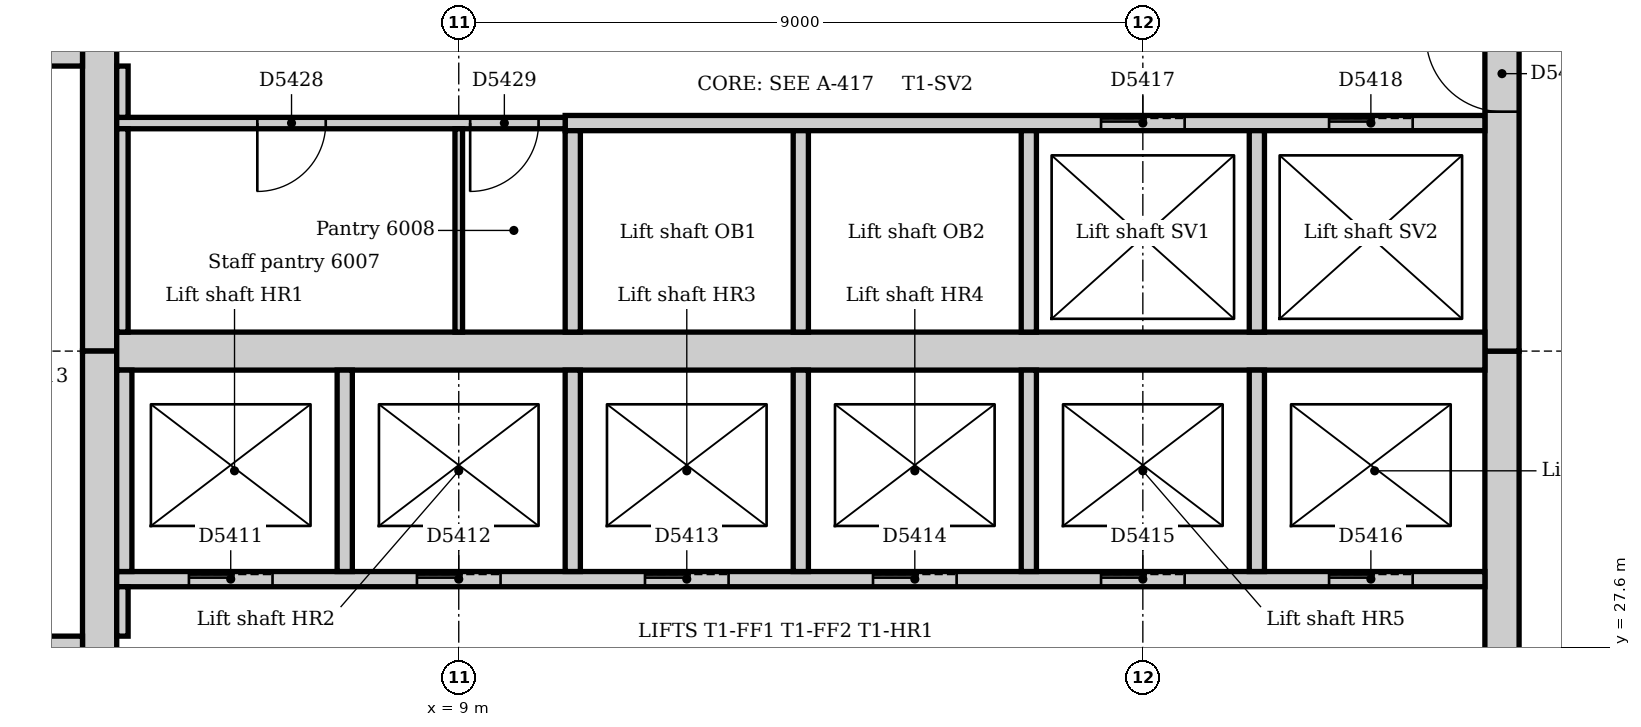
"""IFC4 building model, lengths in metres.
Left out: names, types, materials, properties, quantities, classifications, styles, units other than length and angle.
Written with IfcOpenShell. Run it as: python <this file> out.ifc"""

import sys

from ifc_helpers import new_model, si_unit, direction, frame, frame_2d, origin, place, context, subcontext, project, spatial, rectangle, extrude, element, fill, save


model = new_model("IFC4")
c1 = context("Model", 3, precision=1e-05, world=origin(), true_north=direction((0.0, 1.0)))
c2 = subcontext(c1, "Body", "Model", "MODEL_VIEW")
j1 = project(units=[si_unit("LENGTHUNIT", "METRE"), si_unit("PLANEANGLEUNIT", "RADIAN")], contexts=[c1])
p1 = place(None, origin())
s1 = spatial("IfcSite", under=j1, at=p1, CompositionType="ELEMENT")
p2 = place(p1, origin())
s2 = spatial("IfcBuilding", under=s1, at=p2, CompositionType="ELEMENT")
p3 = place(p2, frame((0.0, 0.0, 251.0)))
s3 = spatial("IfcBuildingStorey", under=s2, at=p3, CompositionType="ELEMENT", Elevation=251.0)
p4 = place(p3, frame((22.725, 21.0, 0.0), z_axis=(0.0, 0.0, 1.0), x_axis=(0.0, 1.0, 0.0)))
e1 = element("IfcWall", 1, at=p4, inside=s3, PredefinedType="SOLIDWALL", context=c2, shape_type="SweptSolid", body=[
    extrude(rectangle(XDim=10.5, YDim=0.45, at=frame_2d((5.25, 0.0))), origin(), (0.0, 0.0, 1.0), 4.0),
])
p5 = place(p4, frame((4.35, 0.0, 0.0)))
e2 = element("IfcOpeningElement", 2, at=p5, cuts=e1, PredefinedType="OPENING", context=c2, shape_type="SweptSolid", body=[
    extrude(rectangle(XDim=1.8, YDim=2.1, at=frame_2d((0.9, 1.05))), frame((0.0, 0.235, 0.0), z_axis=(0.0, -1.0, 0.0), x_axis=(1.0, 0.0, 0.0)), (0.0, 0.0, 1.0), 0.47),
])
p6 = place(p3, frame((22.725, 31.5, 0.0), z_axis=(0.0, 0.0, 1.0), x_axis=(0.0, 1.0, 0.0)))
e3 = element("IfcWall", 3, at=p6, inside=s3, PredefinedType="SOLIDWALL", context=c2, shape_type="SweptSolid", body=[
    extrude(rectangle(XDim=10.5, YDim=0.45, at=frame_2d((5.25, 0.0))), origin(), (0.0, 0.0, 1.0), 4.0),
])
p7 = place(p6, frame((3.15, 0.0, 0.0)))
e4 = element("IfcOpeningElement", 4, at=p7, cuts=e3, PredefinedType="OPENING", context=c2, shape_type="SweptSolid", body=[
    extrude(rectangle(XDim=1.0, YDim=2.1, at=frame_2d((0.5, 1.05))), frame((0.0, 0.235, 0.0), z_axis=(0.0, -1.0, 0.0), x_axis=(1.0, 0.0, 0.0)), (0.0, 0.0, 1.0), 0.47),
])
p8 = place(p6, frame((5.2, 0.0, 0.0)))
e5 = element("IfcOpeningElement", 5, at=p8, cuts=e3, PredefinedType="OPENING", context=c2, shape_type="SweptSolid", body=[
    extrude(rectangle(XDim=1.0, YDim=2.1, at=frame_2d((0.5, 1.05))), frame((0.0, 0.235, 0.0), z_axis=(0.0, -1.0, 0.0), x_axis=(1.0, 0.0, 0.0)), (0.0, 0.0, 1.0), 0.47),
])
p9 = place(p3, frame((4.275, 42.0, 0.0), z_axis=(0.0, 0.0, 1.0), x_axis=(0.0, -1.0, 0.0)))
e6 = element("IfcWall", 6, at=p9, inside=s3, PredefinedType="SOLIDWALL", context=c2, shape_type="SweptSolid", body=[
    extrude(rectangle(XDim=10.5, YDim=0.45, at=frame_2d((5.25, 0.0))), origin(), (0.0, 0.0, 1.0), 4.0),
])
p10 = place(p9, frame((5.3, 0.0, 0.0)))
e7 = element("IfcOpeningElement", 7, at=p10, cuts=e6, PredefinedType="OPENING", context=c2, shape_type="SweptSolid", body=[
    extrude(rectangle(XDim=1.0, YDim=2.1, at=frame_2d((0.5, 1.05))), frame((0.0, 0.235, 0.0), z_axis=(0.0, -1.0, 0.0), x_axis=(1.0, 0.0, 0.0)), (0.0, 0.0, 1.0), 0.47),
])
p11 = place(p3, frame((4.275, 31.5, 0.0), z_axis=(0.0, 0.0, 1.0), x_axis=(0.0, -1.0, 0.0)))
e8 = element("IfcWall", 8, at=p11, inside=s3, PredefinedType="SOLIDWALL", context=c2, shape_type="SweptSolid", body=[
    extrude(rectangle(XDim=10.5, YDim=0.45, at=frame_2d((5.25, 0.0))), origin(), (0.0, 0.0, 1.0), 4.0),
])
p12 = place(p11, frame((4.25, 0.0, 0.0)))
e9 = element("IfcOpeningElement", 9, at=p12, cuts=e8, PredefinedType="OPENING", context=c2, shape_type="SweptSolid", body=[
    extrude(rectangle(XDim=1.0, YDim=2.1, at=frame_2d((0.5, 1.05))), frame((0.0, 0.235, 0.0), z_axis=(0.0, -1.0, 0.0), x_axis=(1.0, 0.0, 0.0)), (0.0, 0.0, 1.0), 0.47),
])
p13 = place(p3, frame((4.5, 31.5, 0.0), z_axis=(0.0, 0.0, 1.0), x_axis=(1.0, 0.0, 0.0)))
e10 = element("IfcWall", 10, at=p13, inside=s3, PredefinedType="SOLIDWALL", context=c2, shape_type="SweptSolid", body=[
    extrude(rectangle(XDim=18.0, YDim=0.5, at=frame_2d((9.0, 0.0))), origin(), (0.0, 0.0, 1.0), 4.0),
])
p14 = place(p3, frame((4.05, 27.625, 0.0), z_axis=(0.0, 0.0, 1.0), x_axis=(-1.0, 0.0, 0.0)))
e11 = element("IfcWall", 11, at=p14, inside=s3, PredefinedType="SOLIDWALL", context=c2, shape_type="SweptSolid", body=[
    extrude(rectangle(XDim=3.69, YDim=0.25, at=frame_2d((1.845, 0.0))), origin(), (0.0, 0.0, 1.0), 4.0),
])
p15 = place(p14, frame((0.55, 0.0, 0.0)))
e12 = element("IfcOpeningElement", 12, at=p15, cuts=e11, PredefinedType="OPENING", context=c2, shape_type="SweptSolid", body=[
    extrude(rectangle(XDim=1.0, YDim=2.1, at=frame_2d((0.5, 1.05))), frame((0.0, 0.135, 0.0), z_axis=(0.0, -1.0, 0.0), x_axis=(1.0, 0.0, 0.0)), (0.0, 0.0, 1.0), 0.27),
])
p16 = place(p3, frame((0.36, 35.375, 0.0), z_axis=(0.0, 0.0, 1.0), x_axis=(1.0, 0.0, 0.0)))
e13 = element("IfcWall", 13, at=p16, inside=s3, PredefinedType="SOLIDWALL", context=c2, shape_type="SweptSolid", body=[
    extrude(rectangle(XDim=3.69, YDim=0.25, at=frame_2d((1.845, 0.0))), origin(), (0.0, 0.0, 1.0), 4.0),
])
p17 = place(p16, frame((2.14, 0.0, 0.0)))
e14 = element("IfcOpeningElement", 14, at=p17, cuts=e13, PredefinedType="OPENING", context=c2, shape_type="SweptSolid", body=[
    extrude(rectangle(XDim=1.0, YDim=2.1, at=frame_2d((0.5, 1.05))), frame((0.0, 0.135, 0.0), z_axis=(0.0, -1.0, 0.0), x_axis=(1.0, 0.0, 0.0)), (0.0, 0.0, 1.0), 0.27),
])
p18 = place(p3, frame((4.5, 28.5, 0.0), z_axis=(0.0, 0.0, 1.0), x_axis=(1.0, 0.0, 0.0)))
e15 = element("IfcWall", 15, at=p18, inside=s3, PredefinedType="PARTITIONING", context=c2, shape_type="SweptSolid", body=[
    extrude(rectangle(XDim=18.0, YDim=0.2, at=frame_2d((9.0, 0.0))), origin(), (0.0, 0.0, 1.0), 3.85),
])
p19 = place(p18, frame((0.95, 0.0, 0.0)))
e16 = element("IfcOpeningElement", 16, at=p19, cuts=e15, PredefinedType="OPENING", context=c2, shape_type="SweptSolid", body=[
    extrude(rectangle(XDim=1.1, YDim=2.1, at=frame_2d((0.55, 1.05))), frame((0.0, 0.11, 0.0), z_axis=(0.0, -1.0, 0.0), x_axis=(1.0, 0.0, 0.0)), (0.0, 0.0, 1.0), 0.22),
])
p20 = place(p18, frame((3.95, 0.0, 0.0)))
e17 = element("IfcOpeningElement", 17, at=p20, cuts=e15, PredefinedType="OPENING", context=c2, shape_type="SweptSolid", body=[
    extrude(rectangle(XDim=1.1, YDim=2.1, at=frame_2d((0.55, 1.05))), frame((0.0, 0.11, 0.0), z_axis=(0.0, -1.0, 0.0), x_axis=(1.0, 0.0, 0.0)), (0.0, 0.0, 1.0), 0.22),
])
p21 = place(p18, frame((6.95, 0.0, 0.0)))
e18 = element("IfcOpeningElement", 18, at=p21, cuts=e15, PredefinedType="OPENING", context=c2, shape_type="SweptSolid", body=[
    extrude(rectangle(XDim=1.1, YDim=2.1, at=frame_2d((0.55, 1.05))), frame((0.0, 0.11, 0.0), z_axis=(0.0, -1.0, 0.0), x_axis=(1.0, 0.0, 0.0)), (0.0, 0.0, 1.0), 0.22),
])
p22 = place(p18, frame((9.95, 0.0, 0.0)))
e19 = element("IfcOpeningElement", 19, at=p22, cuts=e15, PredefinedType="OPENING", context=c2, shape_type="SweptSolid", body=[
    extrude(rectangle(XDim=1.1, YDim=2.1, at=frame_2d((0.55, 1.05))), frame((0.0, 0.11, 0.0), z_axis=(0.0, -1.0, 0.0), x_axis=(1.0, 0.0, 0.0)), (0.0, 0.0, 1.0), 0.22),
])
p23 = place(p18, frame((12.95, 0.0, 0.0)))
e20 = element("IfcOpeningElement", 20, at=p23, cuts=e15, PredefinedType="OPENING", context=c2, shape_type="SweptSolid", body=[
    extrude(rectangle(XDim=1.1, YDim=2.1, at=frame_2d((0.55, 1.05))), frame((0.0, 0.11, 0.0), z_axis=(0.0, -1.0, 0.0), x_axis=(1.0, 0.0, 0.0)), (0.0, 0.0, 1.0), 0.22),
])
p24 = place(p18, frame((15.95, 0.0, 0.0)))
e21 = element("IfcOpeningElement", 21, at=p24, cuts=e15, PredefinedType="OPENING", context=c2, shape_type="SweptSolid", body=[
    extrude(rectangle(XDim=1.1, YDim=2.1, at=frame_2d((0.55, 1.05))), frame((0.0, 0.11, 0.0), z_axis=(0.0, -1.0, 0.0), x_axis=(1.0, 0.0, 0.0)), (0.0, 0.0, 1.0), 0.22),
])
p25 = place(p3, frame((10.4, 34.5, 0.0), z_axis=(0.0, 0.0, 1.0), x_axis=(1.0, 0.0, 0.0)))
e22 = element("IfcWall", 22, at=p25, inside=s3, PredefinedType="PARTITIONING", context=c2, shape_type="SweptSolid", body=[
    extrude(rectangle(XDim=12.1, YDim=0.2, at=frame_2d((6.05, 0.0))), origin(), (0.0, 0.0, 1.0), 3.85),
])
p26 = place(p25, frame((7.05, 0.0, 0.0)))
e23 = element("IfcOpeningElement", 23, at=p26, cuts=e22, PredefinedType="OPENING", context=c2, shape_type="SweptSolid", body=[
    extrude(rectangle(XDim=1.1, YDim=2.1, at=frame_2d((0.55, 1.05))), frame((0.0, 0.11, 0.0), z_axis=(0.0, -1.0, 0.0), x_axis=(1.0, 0.0, 0.0)), (0.0, 0.0, 1.0), 0.22),
])
p27 = place(p25, frame((10.05, 0.0, 0.0)))
e24 = element("IfcOpeningElement", 24, at=p27, cuts=e22, PredefinedType="OPENING", context=c2, shape_type="SweptSolid", body=[
    extrude(rectangle(XDim=1.1, YDim=2.1, at=frame_2d((0.55, 1.05))), frame((0.0, 0.11, 0.0), z_axis=(0.0, -1.0, 0.0), x_axis=(1.0, 0.0, 0.0)), (0.0, 0.0, 1.0), 0.22),
])
for number, where, z_axis, x_axis in (
    (25, (10.5, 28.6, 0.0), (0.0, 0.0, 1.0), (0.0, 1.0, 0.0)),
    (26, (10.5, 31.75, 0.0), (0.0, 0.0, 1.0), (0.0, 1.0, 0.0)),
    (27, (13.5, 28.6, 0.0), (0.0, 0.0, 1.0), (0.0, 1.0, 0.0)),
    (28, (13.5, 31.75, 0.0), (0.0, 0.0, 1.0), (0.0, 1.0, 0.0)),
    (29, (16.5, 28.6, 0.0), (0.0, 0.0, 1.0), (0.0, 1.0, 0.0)),
    (30, (16.5, 31.75, 0.0), (0.0, 0.0, 1.0), (0.0, 1.0, 0.0)),
    (31, (19.5, 28.6, 0.0), (0.0, 0.0, 1.0), (0.0, 1.0, 0.0)),
    (32, (19.5, 31.75, 0.0), (0.0, 0.0, 1.0), (0.0, 1.0, 0.0)),
    (33, (4.6, 28.6, 0.0), (0.0, 0.0, 1.0), (0.0, 1.0, 0.0)),
    (34, (7.5, 28.6, 0.0), (0.0, 0.0, 1.0), (0.0, 1.0, 0.0)),
):
    element("IfcWall", number, at=place(p3, frame(where, z_axis=z_axis, x_axis=x_axis)), inside=s3, PredefinedType="PARTITIONING", context=c2, shape_type="SweptSolid", body=[
        extrude(rectangle(XDim=2.65, YDim=0.2, at=frame_2d((1.325, 0.0))), origin(), (0.0, 0.0, 1.0), 3.85),
    ])
p28 = place(p3, frame((4.5, 34.5, 0.0), z_axis=(0.0, 0.0, 1.0), x_axis=(1.0, 0.0, 0.0)))
e35 = element("IfcWall", 35, at=p28, inside=s3, PredefinedType="PARTITIONING", context=c2, shape_type="SweptSolid", body=[
    extrude(rectangle(XDim=5.9, YDim=0.15, at=frame_2d((2.95, 0.0))), origin(), (0.0, 0.0, 1.0), 3.85),
])
p29 = place(p28, frame((1.85, 0.0, 0.0)))
e36 = element("IfcOpeningElement", 36, at=p29, cuts=e35, PredefinedType="OPENING", context=c2, shape_type="SweptSolid", body=[
    extrude(rectangle(XDim=0.9, YDim=2.1, at=frame_2d((0.45, 1.05))), frame((0.0, 0.085, 0.0), z_axis=(0.0, -1.0, 0.0), x_axis=(1.0, 0.0, 0.0)), (0.0, 0.0, 1.0), 0.17),
])
p30 = place(p28, frame((4.65, 0.0, 0.0)))
e37 = element("IfcOpeningElement", 37, at=p30, cuts=e35, PredefinedType="OPENING", context=c2, shape_type="SweptSolid", body=[
    extrude(rectangle(XDim=0.9, YDim=2.1, at=frame_2d((0.45, 1.05))), frame((0.0, 0.085, 0.0), z_axis=(0.0, -1.0, 0.0), x_axis=(1.0, 0.0, 0.0)), (0.0, 0.0, 1.0), 0.17),
])
p31 = place(p3, frame((4.575, 34.575, 0.0), z_axis=(0.0, 0.0, 1.0), x_axis=(0.0, 1.0, 0.0)))
e38 = element("IfcWall", 38, at=p31, inside=s3, PredefinedType="PARTITIONING", context=c2, shape_type="SweptSolid", body=[
    extrude(rectangle(XDim=0.675, YDim=0.15, at=frame_2d((0.338, 0.0))), origin(), (0.0, 0.0, 1.0), 3.85),
])
p32 = place(p3, frame((4.575, 31.75, 0.0), z_axis=(0.0, 0.0, 1.0), x_axis=(0.0, 1.0, 0.0)))
e39 = element("IfcWall", 39, at=p32, inside=s3, PredefinedType="PARTITIONING", context=c2, shape_type="SweptSolid", body=[
    extrude(rectangle(XDim=2.675, YDim=0.15, at=frame_2d((1.337, 0.0))), origin(), (0.0, 0.0, 1.0), 3.85),
])
p33 = place(p3, frame((4.575, 27.75, 0.0), z_axis=(0.0, 0.0, 1.0), x_axis=(0.0, 1.0, 0.0)))
e40 = element("IfcWall", 40, at=p33, inside=s3, PredefinedType="PARTITIONING", context=c2, shape_type="SweptSolid", body=[
    extrude(rectangle(XDim=0.65, YDim=0.15, at=frame_2d((0.325, 0.0))), origin(), (0.0, 0.0, 1.0), 3.85),
])
p34 = place(p3, frame((9.0, 31.75, 0.0), z_axis=(0.0, 0.0, 1.0), x_axis=(0.0, 1.0, 0.0)))
e41 = element("IfcWall", 41, at=p34, inside=s3, PredefinedType="PARTITIONING", context=c2, shape_type="SweptSolid", body=[
    extrude(rectangle(XDim=2.675, YDim=0.1, at=frame_2d((1.337, 0.0))), origin(), (0.0, 0.0, 1.0), 3.85),
])
p35 = place(p19, origin())
e42 = element("IfcDoor", 42, at=p35, inside=s3, OperationType="SLIDING_TO_LEFT", PredefinedType="DOOR", context=c2, shape_type="SweptSolid", body=[
    extrude(rectangle(XDim=1.1, YDim=2.1, at=frame_2d((0.55, 1.05))), frame((0.0, 0.025, 0.0), z_axis=(0.0, -1.0, 0.0), x_axis=(1.0, 0.0, 0.0)), (0.0, 0.0, 1.0), 0.05),
])
fill(e16, e42)
p36 = place(p20, origin())
e43 = element("IfcDoor", 43, at=p36, inside=s3, OperationType="SLIDING_TO_LEFT", PredefinedType="DOOR", context=c2, shape_type="SweptSolid", body=[
    extrude(rectangle(XDim=1.1, YDim=2.1, at=frame_2d((0.55, 1.05))), frame((0.0, 0.025, 0.0), z_axis=(0.0, -1.0, 0.0), x_axis=(1.0, 0.0, 0.0)), (0.0, 0.0, 1.0), 0.05),
])
fill(e17, e43)
p37 = place(p21, origin())
e44 = element("IfcDoor", 44, at=p37, inside=s3, OperationType="SLIDING_TO_LEFT", PredefinedType="DOOR", context=c2, shape_type="SweptSolid", body=[
    extrude(rectangle(XDim=1.1, YDim=2.1, at=frame_2d((0.55, 1.05))), frame((0.0, 0.025, 0.0), z_axis=(0.0, -1.0, 0.0), x_axis=(1.0, 0.0, 0.0)), (0.0, 0.0, 1.0), 0.05),
])
fill(e18, e44)
p38 = place(p22, origin())
e45 = element("IfcDoor", 45, at=p38, inside=s3, OperationType="SLIDING_TO_LEFT", PredefinedType="DOOR", context=c2, shape_type="SweptSolid", body=[
    extrude(rectangle(XDim=1.1, YDim=2.1, at=frame_2d((0.55, 1.05))), frame((0.0, 0.025, 0.0), z_axis=(0.0, -1.0, 0.0), x_axis=(1.0, 0.0, 0.0)), (0.0, 0.0, 1.0), 0.05),
])
fill(e19, e45)
p39 = place(p23, origin())
e46 = element("IfcDoor", 46, at=p39, inside=s3, OperationType="SLIDING_TO_LEFT", PredefinedType="DOOR", context=c2, shape_type="SweptSolid", body=[
    extrude(rectangle(XDim=1.1, YDim=2.1, at=frame_2d((0.55, 1.05))), frame((0.0, 0.025, 0.0), z_axis=(0.0, -1.0, 0.0), x_axis=(1.0, 0.0, 0.0)), (0.0, 0.0, 1.0), 0.05),
])
fill(e20, e46)
p40 = place(p24, origin())
e47 = element("IfcDoor", 47, at=p40, inside=s3, OperationType="SLIDING_TO_LEFT", PredefinedType="DOOR", context=c2, shape_type="SweptSolid", body=[
    extrude(rectangle(XDim=1.1, YDim=2.1, at=frame_2d((0.55, 1.05))), frame((0.0, 0.025, 0.0), z_axis=(0.0, -1.0, 0.0), x_axis=(1.0, 0.0, 0.0)), (0.0, 0.0, 1.0), 0.05),
])
fill(e21, e47)
p41 = place(p26, origin())
e48 = element("IfcDoor", 48, at=p41, inside=s3, OperationType="SLIDING_TO_LEFT", PredefinedType="DOOR", context=c2, shape_type="SweptSolid", body=[
    extrude(rectangle(XDim=1.1, YDim=2.1, at=frame_2d((0.55, 1.05))), frame((0.0, 0.025, 0.0), z_axis=(0.0, -1.0, 0.0), x_axis=(1.0, 0.0, 0.0)), (0.0, 0.0, 1.0), 0.05),
])
fill(e23, e48)
p42 = place(p27, origin())
e49 = element("IfcDoor", 49, at=p42, inside=s3, OperationType="SLIDING_TO_LEFT", PredefinedType="DOOR", context=c2, shape_type="SweptSolid", body=[
    extrude(rectangle(XDim=1.1, YDim=2.1, at=frame_2d((0.55, 1.05))), frame((0.0, 0.025, 0.0), z_axis=(0.0, -1.0, 0.0), x_axis=(1.0, 0.0, 0.0)), (0.0, 0.0, 1.0), 0.05),
])
fill(e24, e49)
p43 = place(p7, origin())
e50 = element("IfcDoor", 50, at=p43, inside=s3, OperationType="SINGLE_SWING_RIGHT", PredefinedType="DOOR", context=c2, shape_type="SweptSolid", body=[
    extrude(rectangle(XDim=1.0, YDim=2.1, at=frame_2d((0.5, 1.05))), frame((0.0, 0.025, 0.0), z_axis=(0.0, -1.0, 0.0), x_axis=(1.0, 0.0, 0.0)), (0.0, 0.0, 1.0), 0.05),
])
fill(e4, e50)
p44 = place(p29, frame((0.9, 0.0, 0.0), z_axis=(0.0, 0.0, 1.0), x_axis=(-1.0, 0.0, 0.0)))
e51 = element("IfcDoor", 51, at=p44, inside=s3, OperationType="SINGLE_SWING_RIGHT", PredefinedType="DOOR", context=c2, shape_type="SweptSolid", body=[
    extrude(rectangle(XDim=0.9, YDim=2.1, at=frame_2d((0.45, 1.05))), frame((0.0, 0.025, 0.0), z_axis=(0.0, -1.0, 0.0), x_axis=(1.0, 0.0, 0.0)), (0.0, 0.0, 1.0), 0.05),
])
fill(e36, e51)
p45 = place(p30, frame((0.9, 0.0, 0.0), z_axis=(0.0, 0.0, 1.0), x_axis=(-1.0, 0.0, 0.0)))
e52 = element("IfcDoor", 52, at=p45, inside=s3, OperationType="SINGLE_SWING_RIGHT", PredefinedType="DOOR", context=c2, shape_type="SweptSolid", body=[
    extrude(rectangle(XDim=0.9, YDim=2.1, at=frame_2d((0.45, 1.05))), frame((0.0, 0.025, 0.0), z_axis=(0.0, -1.0, 0.0), x_axis=(1.0, 0.0, 0.0)), (0.0, 0.0, 1.0), 0.05),
])
fill(e37, e52)
save(model, sys.argv[1])
